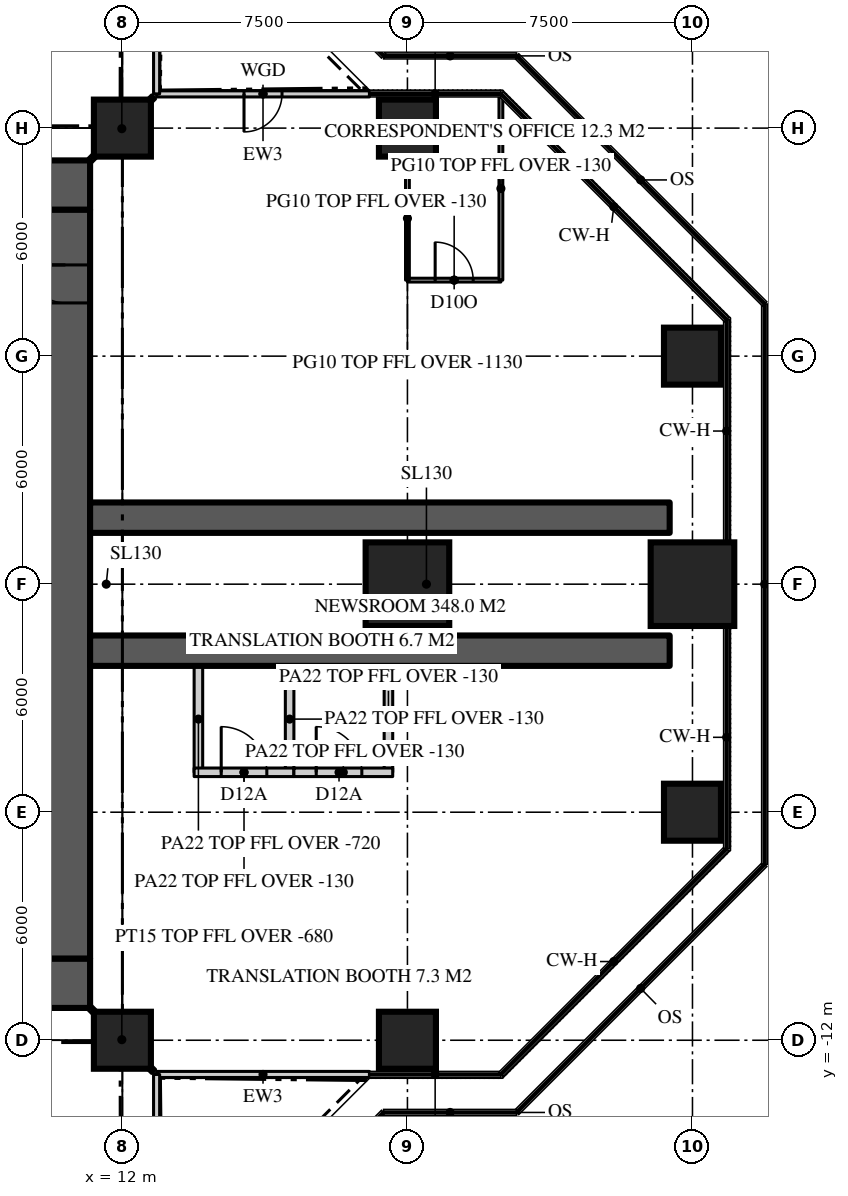
"""IFC4 building model, lengths in metres.
Left out: names, types, materials, properties, quantities, classifications, styles, units other than length and angle.
Written with IfcOpenShell. Run it as: python <this file> out.ifc"""

import sys

from ifc_helpers import new_model, si_unit, direction, frame, frame_2d, origin, origin_2d, place, context, subcontext, project, spatial, rectangle, extrude, element, fill, save


model = new_model("IFC4")
c1 = context("Model", 3, precision=1e-05, world=origin(), true_north=direction((0.0, 1.0)))
c2 = subcontext(c1, "Body", "Model", "MODEL_VIEW")
j1 = project(units=[si_unit("LENGTHUNIT", "METRE"), si_unit("PLANEANGLEUNIT", "RADIAN")], contexts=[c1])
p1 = place(None, origin())
s1 = spatial("IfcSite", under=j1, at=p1, CompositionType="ELEMENT")
p2 = place(p1, origin())
s2 = spatial("IfcBuilding", under=s1, at=p2, CompositionType="ELEMENT")
p3 = place(p2, frame((0.0, 0.0, 247.8)))
s3 = spatial("IfcBuildingStorey", under=s2, at=p3, CompositionType="ELEMENT", Elevation=247.8)
p4 = place(p3, frame((-11.15, 10.5, 0.0), z_axis=(0.0, 0.0, 1.0), x_axis=(1.0, 0.0, 0.0)))
e1 = element("IfcWall", 1, at=p4, inside=s3, PredefinedType="SHEAR", context=c2, shape_type="SweptSolid", body=[
    extrude(rectangle(XDim=22.3, YDim=1.3, at=frame_2d((11.15, 0.0))), origin(), (0.0, 0.0, 1.0), 3.9),
])
p5 = place(p4, frame((4.25, 0.0, 0.0)))
e2 = element("IfcOpeningElement", 2, at=p5, cuts=e1, PredefinedType="OPENING", context=c2, shape_type="SweptSolid", body=[
    extrude(rectangle(XDim=1.8, YDim=2.2, at=frame_2d((0.9, 1.1))), frame((0.0, 0.66, 0.0), z_axis=(0.0, -1.0, 0.0), x_axis=(1.0, 0.0, 0.0)), (0.0, 0.0, 1.0), 1.32),
])
p6 = place(p4, frame((16.25, 0.0, 0.0)))
e3 = element("IfcOpeningElement", 3, at=p6, cuts=e1, PredefinedType="OPENING", context=c2, shape_type="SweptSolid", body=[
    extrude(rectangle(XDim=1.8, YDim=2.2, at=frame_2d((0.9, 1.1))), frame((0.0, 0.66, 0.0), z_axis=(0.0, -1.0, 0.0), x_axis=(1.0, 0.0, 0.0)), (0.0, 0.0, 1.0), 1.32),
])
p7 = place(p3, frame((11.15, -10.5, 0.0), z_axis=(0.0, 0.0, 1.0), x_axis=(-1.0, 0.0, 0.0)))
e4 = element("IfcWall", 4, at=p7, inside=s3, PredefinedType="SHEAR", context=c2, shape_type="SweptSolid", body=[
    extrude(rectangle(XDim=22.3, YDim=1.3, at=frame_2d((11.15, 0.0))), origin(), (0.0, 0.0, 1.0), 3.9),
])
p8 = place(p7, frame((16.25, 0.0, 0.0)))
e5 = element("IfcOpeningElement", 5, at=p8, cuts=e4, PredefinedType="OPENING", context=c2, shape_type="SweptSolid", body=[
    extrude(rectangle(XDim=1.8, YDim=2.2, at=frame_2d((0.9, 1.1))), frame((0.0, 0.66, 0.0), z_axis=(0.0, -1.0, 0.0), x_axis=(1.0, 0.0, 0.0)), (0.0, 0.0, 1.0), 1.32),
])
p9 = place(p7, frame((4.25, 0.0, 0.0)))
e6 = element("IfcOpeningElement", 6, at=p9, cuts=e4, PredefinedType="OPENING", context=c2, shape_type="SweptSolid", body=[
    extrude(rectangle(XDim=1.8, YDim=2.2, at=frame_2d((0.9, 1.1))), frame((0.0, 0.66, 0.0), z_axis=(0.0, -1.0, 0.0), x_axis=(1.0, 0.0, 0.0)), (0.0, 0.0, 1.0), 1.32),
])
p10 = place(p3, frame((10.5, -9.85, 0.0), z_axis=(0.0, 0.0, 1.0), x_axis=(0.0, 1.0, 0.0)))
e7 = element("IfcWall", 7, at=p10, inside=s3, PredefinedType="SHEAR", context=c2, shape_type="SweptSolid", body=[
    extrude(rectangle(XDim=19.7, YDim=1.3, at=frame_2d((9.85, 0.0))), origin(), (0.0, 0.0, 1.0), 3.9),
])
p11 = place(p10, frame((17.25, 0.0, 0.0)))
e8 = element("IfcOpeningElement", 8, at=p11, cuts=e7, PredefinedType="OPENING", context=c2, shape_type="SweptSolid", body=[
    extrude(rectangle(XDim=1.0, YDim=2.2, at=frame_2d((0.5, 1.1))), frame((0.0, 0.66, 0.0), z_axis=(0.0, -1.0, 0.0), x_axis=(1.0, 0.0, 0.0)), (0.0, 0.0, 1.0), 1.32),
])
for number, where, z_axis, x_axis in (
    (9, (11.15, -1.75, 0.0), (0.0, 0.0, 1.0), (1.0, 0.0, 0.0)),
    (10, (11.15, 1.75, 0.0), (0.0, 0.0, 1.0), (1.0, 0.0, 0.0)),
):
    element("IfcWall", number, at=place(p3, frame(where, z_axis=z_axis, x_axis=x_axis)), inside=s3, PredefinedType="SHEAR", context=c2, shape_type="SweptSolid", body=[
        extrude(rectangle(XDim=15.25, YDim=0.8, at=frame_2d((7.625, 0.0))), origin(), (0.0, 0.0, 1.0), 3.9),
    ])
for number, where, z_axis, x_axis in (
    (11, (12.0, -12.0, 0.0), (0.0, 0.0, 1.0), (1.0, 0.0, 0.0)),
    (12, (19.5, -12.0, 0.0), (0.0, 0.0, 1.0), (1.0, 0.0, 0.0)),
    (13, (27.0, -6.0, 0.0), (0.0, 0.0, 1.0), (1.0, 0.0, 0.0)),
):
    element("IfcColumn", number, at=place(p3, frame(where, z_axis=z_axis, x_axis=x_axis)), inside=s3, PredefinedType="COLUMN", context=c2, shape_type="SweptSolid", body=[
        extrude(rectangle(XDim=1.5, YDim=1.5, at=origin_2d()), origin(), (0.0, 0.0, 1.0), 3.9),
    ])
for number, where, z_axis, x_axis in (
    (14, (19.5, 0.0, 0.0), (0.0, 0.0, 1.0), (1.0, 0.0, 0.0)),
    (15, (27.0, 0.0, 0.0), (0.0, 0.0, 1.0), (1.0, 0.0, 0.0)),
):
    element("IfcColumn", number, at=place(p3, frame(where, z_axis=z_axis, x_axis=x_axis)), inside=s3, PredefinedType="COLUMN", context=c2, shape_type="SweptSolid", body=[
        extrude(rectangle(XDim=2.2, YDim=2.2, at=origin_2d()), origin(), (0.0, 0.0, 1.0), 3.9),
    ])
for number, where, z_axis, x_axis in (
    (16, (27.0, 6.0, 0.0), (0.0, 0.0, 1.0), (1.0, 0.0, 0.0)),
    (17, (12.0, 12.0, 0.0), (0.0, 0.0, 1.0), (1.0, 0.0, 0.0)),
    (18, (19.5, 12.0, 0.0), (0.0, 0.0, 1.0), (1.0, 0.0, 0.0)),
):
    element("IfcColumn", number, at=place(p3, frame(where, z_axis=z_axis, x_axis=x_axis)), inside=s3, PredefinedType="COLUMN", context=c2, shape_type="SweptSolid", body=[
        extrude(rectangle(XDim=1.5, YDim=1.5, at=origin_2d()), origin(), (0.0, 0.0, 1.0), 3.9),
    ])
p12 = place(p3, frame((12.9, -12.9, 0.0), z_axis=(0.0, 0.0, 1.0), x_axis=(1.0, 0.0, 0.0)))
e19 = element("IfcWall", 19, at=p12, inside=s3, PredefinedType="SOLIDWALL", context=c2, shape_type="SweptSolid", body=[
    extrude(rectangle(XDim=5.6, YDim=0.16, at=frame_2d((2.8, 0.0))), origin(), (0.0, 0.0, 1.0), 3.77),
])
p13 = place(p3, frame((18.5, 12.9, 0.0), z_axis=(0.0, 0.0, 1.0), x_axis=(-1.0, 0.0, 0.0)))
e20 = element("IfcWall", 20, at=p13, inside=s3, PredefinedType="SOLIDWALL", context=c2, shape_type="SweptSolid", body=[
    extrude(rectangle(XDim=5.6, YDim=0.16, at=frame_2d((2.8, 0.0))), origin(), (0.0, 0.0, 1.0), 3.77),
])
p14 = place(p13, frame((2.3, 0.0, 0.0)))
e21 = element("IfcOpeningElement", 21, at=p14, cuts=e20, PredefinedType="OPENING", context=c2, shape_type="SweptSolid", body=[
    extrude(rectangle(XDim=1.0, YDim=2.2, at=frame_2d((0.5, 1.1))), frame((0.0, 0.09, 0.0), z_axis=(0.0, -1.0, 0.0), x_axis=(1.0, 0.0, 0.0)), (0.0, 0.0, 1.0), 0.18),
])
p15 = place(p3, frame((12.9, 12.9, 0.0), z_axis=(0.0, 0.0, 1.0), x_axis=(0.0, 1.0, 0.0)))
e22 = element("IfcWall", 22, at=p15, inside=s3, PredefinedType="SOLIDWALL", context=c2, shape_type="SweptSolid", body=[
    extrude(rectangle(XDim=5.6, YDim=0.16, at=frame_2d((2.8, 0.0))), origin(), (0.0, 0.0, 1.0), 3.77),
])
p16 = place(p3, frame((12.9, -18.5, 0.0), z_axis=(0.0, 0.0, 1.0), x_axis=(0.0, 1.0, 0.0)))
e23 = element("IfcWall", 23, at=p16, inside=s3, PredefinedType="SOLIDWALL", context=c2, shape_type="SweptSolid", body=[
    extrude(rectangle(XDim=5.6, YDim=0.16, at=frame_2d((2.8, 0.0))), origin(), (0.0, 0.0, 1.0), 3.77),
])
p17 = place(p16, frame((2.3, 0.0, 0.0)))
e24 = element("IfcOpeningElement", 24, at=p17, cuts=e23, PredefinedType="OPENING", context=c2, shape_type="SweptSolid", body=[
    extrude(rectangle(XDim=1.0, YDim=2.2, at=frame_2d((0.5, 1.1))), frame((0.0, 0.09, 0.0), z_axis=(0.0, -1.0, 0.0), x_axis=(1.0, 0.0, 0.0)), (0.0, 0.0, 1.0), 0.18),
])
p18 = place(p3, frame((19.5, 8.0, 0.0), z_axis=(0.0, 0.0, 1.0), x_axis=(1.0, 0.0, 0.0)))
e25 = element("IfcWall", 25, at=p18, inside=s3, PredefinedType="PARTITIONING", context=c2, shape_type="SweptSolid", body=[
    extrude(rectangle(XDim=2.459, YDim=0.1, at=frame_2d((1.229, 0.0))), origin(), (0.0, 0.0, 1.0), 3.77),
])
p19 = place(p18, frame((0.729, 0.0, 0.0)))
e26 = element("IfcOpeningElement", 26, at=p19, cuts=e25, PredefinedType="OPENING", context=c2, shape_type="SweptSolid", body=[
    extrude(rectangle(XDim=1.0, YDim=2.2, at=frame_2d((0.5, 1.1))), frame((0.0, 0.06, 0.0), z_axis=(0.0, -1.0, 0.0), x_axis=(1.0, 0.0, 0.0)), (0.0, 0.0, 1.0), 0.12),
])
p20 = place(p3, frame((19.5, 8.0, 0.0), z_axis=(0.0, 0.0, 1.0), x_axis=(0.0, 1.0, 0.0)))
e27 = element("IfcWall", 27, at=p20, inside=s3, PredefinedType="PARTITIONING", context=c2, shape_type="SweptSolid", body=[
    extrude(rectangle(XDim=3.25, YDim=0.1, at=frame_2d((1.625, 0.0))), origin(), (0.0, 0.0, 1.0), 2.77),
])
p21 = place(p3, frame((21.959, 8.0, 0.0), z_axis=(0.0, 0.0, 1.0), x_axis=(0.0, 1.0, 0.0)))
e28 = element("IfcWall", 28, at=p21, inside=s3, PredefinedType="PARTITIONING", context=c2, shape_type="SweptSolid", body=[
    extrude(rectangle(XDim=4.82, YDim=0.1, at=frame_2d((2.41, 0.0))), origin(), (0.0, 0.0, 1.0), 3.77),
])
p22 = place(p3, frame((14.0, -2.15, 0.0), z_axis=(0.0, 0.0, 1.0), x_axis=(0.0, -1.0, 0.0)))
e29 = element("IfcWall", 29, at=p22, inside=s3, PredefinedType="PARTITIONING", context=c2, shape_type="SweptSolid", body=[
    extrude(rectangle(XDim=2.8, YDim=0.225, at=frame_2d((1.4, 0.0))), origin(), (0.0, 0.0, 1.0), 3.18),
])
p23 = place(p3, frame((16.4, -2.15, 0.0), z_axis=(0.0, 0.0, 1.0), x_axis=(0.0, -1.0, 0.0)))
e30 = element("IfcWall", 30, at=p23, inside=s3, PredefinedType="PARTITIONING", context=c2, shape_type="SweptSolid", body=[
    extrude(rectangle(XDim=2.8, YDim=0.225, at=frame_2d((1.4, 0.0))), origin(), (0.0, 0.0, 1.0), 3.77),
])
p24 = place(p3, frame((13.887, -4.95, 0.0), z_axis=(0.0, 0.0, 1.0), x_axis=(1.0, 0.0, 0.0)))
e31 = element("IfcWall", 31, at=p24, inside=s3, PredefinedType="PARTITIONING", context=c2, shape_type="SweptSolid", body=[
    extrude(rectangle(XDim=2.625, YDim=0.225, at=frame_2d((1.312, 0.0))), origin(), (0.0, 0.0, 1.0), 3.77),
])
p25 = place(p24, frame((0.712, 0.0, 0.0)))
e32 = element("IfcOpeningElement", 32, at=p25, cuts=e31, PredefinedType="OPENING", context=c2, shape_type="SweptSolid", body=[
    extrude(rectangle(XDim=1.2, YDim=2.2, at=frame_2d((0.6, 1.1))), frame((0.0, 0.123, 0.0), z_axis=(0.0, -1.0, 0.0), x_axis=(1.0, 0.0, 0.0)), (0.0, 0.0, 1.0), 0.245),
])
p26 = place(p3, frame((19.0, -2.15, 0.0), z_axis=(0.0, 0.0, 1.0), x_axis=(0.0, -1.0, 0.0)))
e33 = element("IfcWall", 33, at=p26, inside=s3, PredefinedType="PARTITIONING", context=c2, shape_type="SweptSolid", body=[
    extrude(rectangle(XDim=2.8, YDim=0.225, at=frame_2d((1.4, 0.0))), origin(), (0.0, 0.0, 1.0), 3.77),
])
p27 = place(p3, frame((16.512, -4.95, 0.0), z_axis=(0.0, 0.0, 1.0), x_axis=(1.0, 0.0, 0.0)))
e34 = element("IfcWall", 34, at=p27, inside=s3, PredefinedType="PARTITIONING", context=c2, shape_type="SweptSolid", body=[
    extrude(rectangle(XDim=2.6, YDim=0.225, at=frame_2d((1.3, 0.0))), origin(), (0.0, 0.0, 1.0), 3.77),
])
p28 = place(p27, frame((0.587, 0.0, 0.0)))
e35 = element("IfcOpeningElement", 35, at=p28, cuts=e34, PredefinedType="OPENING", context=c2, shape_type="SweptSolid", body=[
    extrude(rectangle(XDim=1.2, YDim=2.2, at=frame_2d((0.6, 1.1))), frame((0.0, 0.123, 0.0), z_axis=(0.0, -1.0, 0.0), x_axis=(1.0, 0.0, 0.0)), (0.0, 0.0, 1.0), 0.245),
])
for number, where, z_axis, x_axis in (
    (36, (11.15, 11.15, 0.0), (0.0, 0.0, 1.0), (0.707, 0.707, 0.0)),
    (37, (11.15, -11.15, 0.0), (0.0, 0.0, 1.0), (0.707, -0.707, 0.0)),
):
    element("IfcWall", number, at=place(p3, frame(where, z_axis=z_axis, x_axis=x_axis)), inside=s3, PredefinedType="PARTITIONING", context=c2, shape_type="SweptSolid", body=[
        extrude(rectangle(XDim=2.362, YDim=0.15, at=frame_2d((1.181, 0.0))), origin(), (0.0, 0.0, 1.0), 3.22),
    ])
p29 = place(p14, origin())
e38 = element("IfcDoor", 38, at=p29, inside=s3, OperationType="SINGLE_SWING_RIGHT", PredefinedType="DOOR", context=c2, shape_type="SweptSolid", body=[
    extrude(rectangle(XDim=1.0, YDim=2.2, at=frame_2d((0.5, 1.1))), frame((0.0, 0.025, 0.0), z_axis=(0.0, -1.0, 0.0), x_axis=(1.0, 0.0, 0.0)), (0.0, 0.0, 1.0), 0.05),
])
fill(e21, e38)
p30 = place(p11, origin())
e39 = element("IfcDoor", 39, at=p30, inside=s3, OperationType="SINGLE_SWING_RIGHT", PredefinedType="DOOR", context=c2, shape_type="SweptSolid", body=[
    extrude(rectangle(XDim=1.0, YDim=2.2, at=frame_2d((0.5, 1.1))), frame((0.0, 0.025, 0.0), z_axis=(0.0, -1.0, 0.0), x_axis=(1.0, 0.0, 0.0)), (0.0, 0.0, 1.0), 0.05),
])
fill(e8, e39)
p31 = place(p19, origin())
e40 = element("IfcDoor", 40, at=p31, inside=s3, OperationType="SINGLE_SWING_LEFT", PredefinedType="DOOR", context=c2, shape_type="SweptSolid", body=[
    extrude(rectangle(XDim=1.0, YDim=2.2, at=frame_2d((0.5, 1.1))), frame((0.0, 0.025, 0.0), z_axis=(0.0, -1.0, 0.0), x_axis=(1.0, 0.0, 0.0)), (0.0, 0.0, 1.0), 0.05),
])
fill(e26, e40)
p32 = place(p25, origin())
e41 = element("IfcDoor", 41, at=p32, inside=s3, OperationType="SINGLE_SWING_LEFT", PredefinedType="DOOR", context=c2, shape_type="SweptSolid", body=[
    extrude(rectangle(XDim=1.2, YDim=2.2, at=frame_2d((0.6, 1.1))), frame((0.0, 0.025, 0.0), z_axis=(0.0, -1.0, 0.0), x_axis=(1.0, 0.0, 0.0)), (0.0, 0.0, 1.0), 0.05),
])
fill(e32, e41)
p33 = place(p28, origin())
e42 = element("IfcDoor", 42, at=p33, inside=s3, OperationType="SINGLE_SWING_LEFT", PredefinedType="DOOR", context=c2, shape_type="SweptSolid", body=[
    extrude(rectangle(XDim=1.2, YDim=2.2, at=frame_2d((0.6, 1.1))), frame((0.0, 0.025, 0.0), z_axis=(0.0, -1.0, 0.0), x_axis=(1.0, 0.0, 0.0)), (0.0, 0.0, 1.0), 0.05),
])
fill(e35, e42)
save(model, sys.argv[1])
